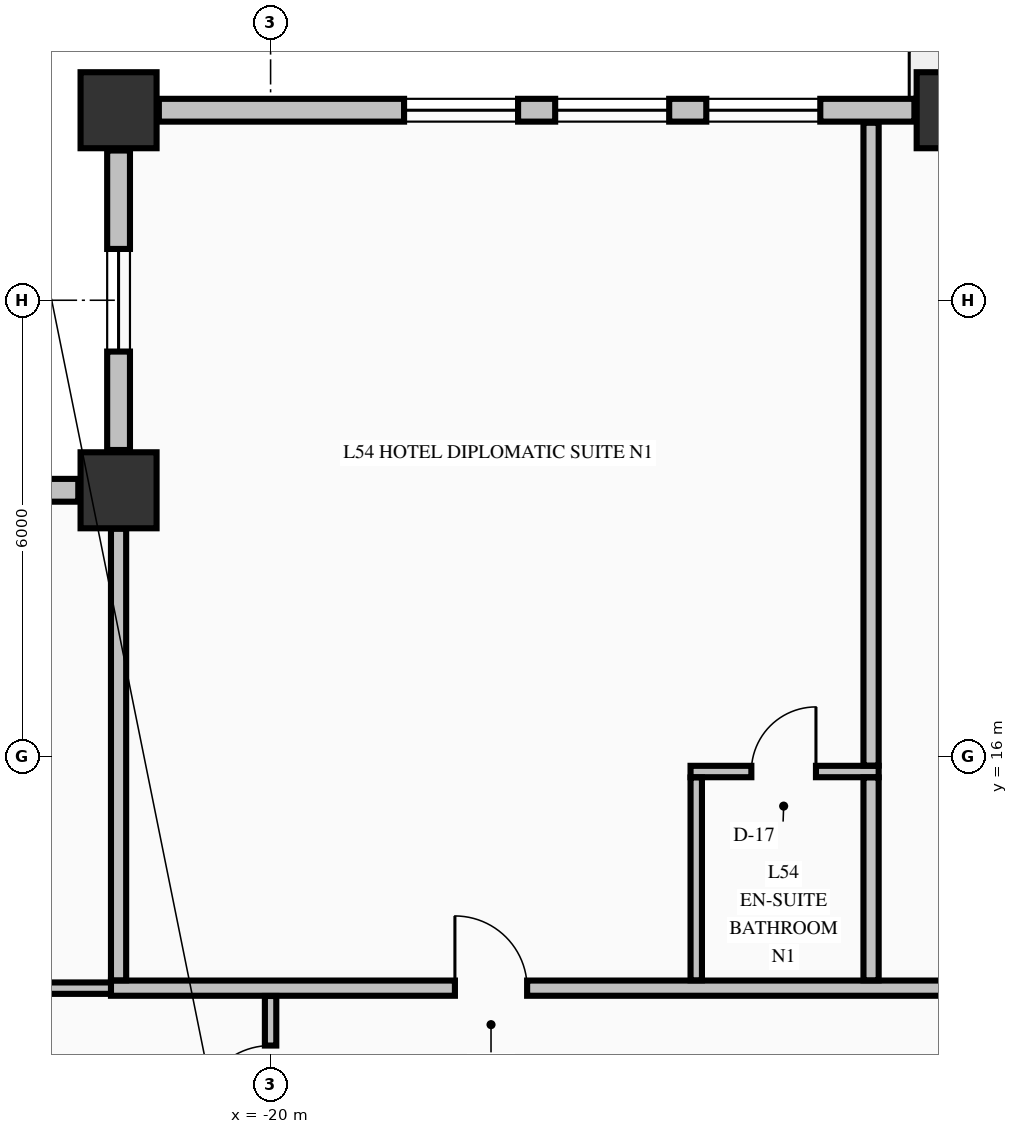
"""IFC4 building model, lengths in metres.
Left out: names, types, materials, properties, quantities, classifications, styles, units other than length and angle.
Written with IfcOpenShell. Run it as: python <this file> out.ifc"""

import sys

from ifc_helpers import new_model, si_unit, direction, frame, frame_2d, origin, origin_2d, place, context, subcontext, project, spatial, rectangle, extrude, element, fill, save


model = new_model("IFC4")
c1 = context("Model", 3, precision=1e-05, world=origin(), true_north=direction((0.0, 1.0)))
c2 = subcontext(c1, "Body", "Model", "MODEL_VIEW")
j1 = project(units=[si_unit("LENGTHUNIT", "METRE"), si_unit("PLANEANGLEUNIT", "RADIAN")], contexts=[c1])
p1 = place(None, origin())
s1 = spatial("IfcSite", under=j1, at=p1, CompositionType="ELEMENT")
p2 = place(p1, origin())
s2 = spatial("IfcBuilding", under=s1, at=p2, CompositionType="ELEMENT")
p3 = place(p2, frame((0.0, 0.0, 208.46)))
s3 = spatial("IfcBuildingStorey", under=s2, at=p3, CompositionType="ELEMENT", Elevation=208.46)
for number, where, z_axis, x_axis in (
    (1, (-22.0, 24.5, -0.25), (0.0, 0.0, 1.0), (1.0, 0.0, 0.0)),
    (2, (-11.0, 24.5, -0.25), (0.0, 0.0, 1.0), (1.0, 0.0, 0.0)),
    (3, (-22.0, 19.5, -0.25), (0.0, 0.0, 1.0), (1.0, 0.0, 0.0)),
):
    element("IfcColumn", number, at=place(p3, frame(where, z_axis=z_axis, x_axis=x_axis)), inside=s3, PredefinedType="COLUMN", context=c2, shape_type="SweptSolid", body=[
        extrude(rectangle(XDim=1.0, YDim=1.0, at=origin_2d()), origin(), (0.0, 0.0, 1.0), 3.325),
    ])
p4 = place(p3, frame((-22.0, 23.97, 0.0), z_axis=(0.0, 0.0, 1.0), x_axis=(0.0, -1.0, 0.0)))
e4 = element("IfcWall", 4, at=p4, inside=s3, PredefinedType="STANDARD", context=c2, shape_type="SweptSolid", body=[
    extrude(rectangle(XDim=3.94, YDim=0.3, at=frame_2d((1.97, 0.0))), origin(), (0.0, 0.0, 1.0), 2.467),
])
p5 = place(p4, frame((1.295, 0.0, 0.68)))
e5 = element("IfcOpeningElement", 5, at=p5, cuts=e4, PredefinedType="OPENING", context=c2, shape_type="SweptSolid", body=[
    extrude(rectangle(XDim=1.35, YDim=1.42, at=frame_2d((0.675, 0.71))), frame((0.0, 0.16, 0.0), z_axis=(0.0, -1.0, 0.0), x_axis=(1.0, 0.0, 0.0)), (0.0, 0.0, 1.0), 0.32),
])
p6 = place(p3, frame((-22.53, 19.5, 0.0), z_axis=(0.0, 0.0, 1.0), x_axis=(-1.0, 0.0, 0.0)))
e6 = element("IfcWall", 6, at=p6, inside=s3, PredefinedType="STANDARD", context=c2, shape_type="SweptSolid", body=[
    extrude(rectangle(XDim=3.94, YDim=0.3, at=frame_2d((1.97, 0.0))), origin(), (0.0, 0.0, 1.0), 2.467),
])
p7 = place(p6, frame((1.295, 0.0, 0.68)))
e7 = element("IfcOpeningElement", 7, at=p7, cuts=e6, PredefinedType="OPENING", context=c2, shape_type="SweptSolid", body=[
    extrude(rectangle(XDim=1.35, YDim=1.42, at=frame_2d((0.675, 0.71))), frame((0.0, 0.16, 0.0), z_axis=(0.0, -1.0, 0.0), x_axis=(1.0, 0.0, 0.0)), (0.0, 0.0, 1.0), 0.32),
])
p8 = place(p3, frame((-11.53, 24.5, 0.0), z_axis=(0.0, 0.0, 1.0), x_axis=(-1.0, 0.0, 0.0)))
e8 = element("IfcWall", 8, at=p8, inside=s3, PredefinedType="STANDARD", context=c2, shape_type="SweptSolid", body=[
    extrude(rectangle(XDim=9.94, YDim=0.3, at=frame_2d((4.97, 0.0))), origin(), (0.0, 0.0, 1.0), 2.467),
])
p9 = place(p8, frame((1.238, 0.0, 0.72)))
e9 = element("IfcOpeningElement", 9, at=p9, cuts=e8, PredefinedType="OPENING", context=c2, shape_type="SweptSolid", body=[
    extrude(rectangle(XDim=1.5, YDim=1.6, at=frame_2d((0.75, 0.8))), frame((0.0, 0.16, 0.0), z_axis=(0.0, -1.0, 0.0), x_axis=(1.0, 0.0, 0.0)), (0.0, 0.0, 1.0), 0.32),
])
p10 = place(p8, frame((3.226, 0.0, 0.72)))
e10 = element("IfcOpeningElement", 10, at=p10, cuts=e8, PredefinedType="OPENING", context=c2, shape_type="SweptSolid", body=[
    extrude(rectangle(XDim=1.5, YDim=1.6, at=frame_2d((0.75, 0.8))), frame((0.0, 0.16, 0.0), z_axis=(0.0, -1.0, 0.0), x_axis=(1.0, 0.0, 0.0)), (0.0, 0.0, 1.0), 0.32),
])
p11 = place(p8, frame((5.214, 0.0, 0.72)))
e11 = element("IfcOpeningElement", 11, at=p11, cuts=e8, PredefinedType="OPENING", context=c2, shape_type="SweptSolid", body=[
    extrude(rectangle(XDim=1.5, YDim=1.6, at=frame_2d((0.75, 0.8))), frame((0.0, 0.16, 0.0), z_axis=(0.0, -1.0, 0.0), x_axis=(1.0, 0.0, 0.0)), (0.0, 0.0, 1.0), 0.32),
])
p12 = place(p3, frame((-26.835, 12.95, 0.0), z_axis=(0.0, 0.0, 1.0), x_axis=(1.0, 0.0, 0.0)))
e12 = element("IfcWall", 12, at=p12, inside=s3, PredefinedType="PARTITIONING", context=c2, shape_type="SweptSolid", body=[
    extrude(rectangle(XDim=4.935, YDim=0.15, at=frame_2d((2.468, 0.0))), origin(), (0.0, 0.0, 1.0), 3.075),
])
p13 = place(p3, frame((-22.1, 12.95, 0.0), z_axis=(0.0, 0.0, 1.0), x_axis=(1.0, 0.0, 0.0)))
e13 = element("IfcWall", 13, at=p13, inside=s3, PredefinedType="PARTITIONING", context=c2, shape_type="SweptSolid", body=[
    extrude(rectangle(XDim=39.2, YDim=0.2, at=frame_2d((19.6, 0.0))), origin(), (0.0, 0.0, 1.0), 3.075),
])
p14 = place(p13, frame((4.525, 0.0, 0.0)))
e14 = element("IfcOpeningElement", 14, at=p14, cuts=e13, PredefinedType="OPENING", context=c2, shape_type="SweptSolid", body=[
    extrude(rectangle(XDim=0.95, YDim=2.15, at=frame_2d((0.475, 1.075))), frame((0.0, 0.11, 0.0), z_axis=(0.0, -1.0, 0.0), x_axis=(1.0, 0.0, 0.0)), (0.0, 0.0, 1.0), 0.22),
])
p15 = place(p13, frame((12.475, 0.0, 0.0)))
e15 = element("IfcOpeningElement", 15, at=p15, cuts=e13, PredefinedType="OPENING", context=c2, shape_type="SweptSolid", body=[
    extrude(rectangle(XDim=0.95, YDim=2.15, at=frame_2d((0.475, 1.075))), frame((0.0, 0.11, 0.0), z_axis=(0.0, -1.0, 0.0), x_axis=(1.0, 0.0, 0.0)), (0.0, 0.0, 1.0), 0.22),
])
p16 = place(p13, frame((22.175, 0.0, 0.0)))
e16 = element("IfcOpeningElement", 16, at=p16, cuts=e13, PredefinedType="OPENING", context=c2, shape_type="SweptSolid", body=[
    extrude(rectangle(XDim=0.95, YDim=2.15, at=frame_2d((0.475, 1.075))), frame((0.0, 0.11, 0.0), z_axis=(0.0, -1.0, 0.0), x_axis=(1.0, 0.0, 0.0)), (0.0, 0.0, 1.0), 0.22),
])
p17 = place(p13, frame((34.675, 0.0, 0.0)))
e17 = element("IfcOpeningElement", 17, at=p17, cuts=e13, PredefinedType="OPENING", context=c2, shape_type="SweptSolid", body=[
    extrude(rectangle(XDim=0.95, YDim=2.15, at=frame_2d((0.475, 1.075))), frame((0.0, 0.11, 0.0), z_axis=(0.0, -1.0, 0.0), x_axis=(1.0, 0.0, 0.0)), (0.0, 0.0, 1.0), 0.22),
])
p18 = place(p3, frame((-14.475, 15.8, 0.0), z_axis=(0.0, 0.0, 1.0), x_axis=(1.0, 0.0, 0.0)))
e18 = element("IfcWall", 18, at=p18, inside=s3, PredefinedType="PARTITIONING", context=c2, shape_type="SweptSolid", body=[
    extrude(rectangle(XDim=2.475, YDim=0.15, at=frame_2d((1.238, 0.0))), origin(), (0.0, 0.0, 1.0), 3.075),
])
p19 = place(p18, frame((0.8, 0.0, 0.0)))
e19 = element("IfcOpeningElement", 19, at=p19, cuts=e18, PredefinedType="OPENING", context=c2, shape_type="SweptSolid", body=[
    extrude(rectangle(XDim=0.85, YDim=2.1, at=frame_2d((0.425, 1.05))), frame((0.0, 0.085, 0.0), z_axis=(0.0, -1.0, 0.0), x_axis=(1.0, 0.0, 0.0)), (0.0, 0.0, 1.0), 0.17),
])
p20 = place(p3, frame((-22.0, 13.053, 0.0), z_axis=(0.0, 0.0, 1.0), x_axis=(0.0, 1.0, 0.0)))
e20 = element("IfcWall", 20, at=p20, inside=s3, PredefinedType="PARTITIONING", context=c2, shape_type="SweptSolid", body=[
    extrude(rectangle(XDim=5.941, YDim=0.2, at=frame_2d((2.97, 0.0))), origin(), (0.0, 0.0, 1.0), 3.075),
])
p21 = place(p3, frame((-20.0, 10.931, 0.0), z_axis=(0.0, 0.0, 1.0), x_axis=(0.0, 1.0, 0.0)))
e21 = element("IfcWall", 21, at=p21, inside=s3, PredefinedType="PARTITIONING", context=c2, shape_type="SweptSolid", body=[
    extrude(rectangle(XDim=1.916, YDim=0.15, at=frame_2d((0.958, 0.0))), origin(), (0.0, 0.0, 1.0), 2.267),
])
p22 = place(p21, frame((0.314, 0.0, 0.0)))
e22 = element("IfcOpeningElement", 22, at=p22, cuts=e21, PredefinedType="OPENING", context=c2, shape_type="SweptSolid", body=[
    extrude(rectangle(XDim=0.95, YDim=2.15, at=frame_2d((0.475, 1.075))), frame((0.0, 0.085, 0.0), z_axis=(0.0, -1.0, 0.0), x_axis=(1.0, 0.0, 0.0)), (0.0, 0.0, 1.0), 0.17),
])
p23 = place(p3, frame((-14.4, 13.053, 0.0), z_axis=(0.0, 0.0, 1.0), x_axis=(0.0, 1.0, 0.0)))
e23 = element("IfcWall", 23, at=p23, inside=s3, PredefinedType="PARTITIONING", context=c2, shape_type="SweptSolid", body=[
    extrude(rectangle(XDim=2.669, YDim=0.15, at=frame_2d((1.334, 0.0))), origin(), (0.0, 0.0, 1.0), 3.075),
])
p24 = place(p3, frame((-12.1, 13.053, 0.0), z_axis=(0.0, 0.0, 1.0), x_axis=(0.0, 1.0, 0.0)))
e24 = element("IfcWall", 24, at=p24, inside=s3, PredefinedType="PARTITIONING", context=c2, shape_type="SweptSolid", body=[
    extrude(rectangle(XDim=2.669, YDim=0.2, at=frame_2d((1.334, 0.0))), origin(), (0.0, 0.0, 1.0), 3.075),
])
p25 = place(p3, frame((-12.1, 15.878, 0.0), z_axis=(0.0, 0.0, 1.0), x_axis=(0.0, 1.0, 0.0)))
e25 = element("IfcWall", 25, at=p25, inside=s3, PredefinedType="PARTITIONING", context=c2, shape_type="SweptSolid", body=[
    extrude(rectangle(XDim=8.457, YDim=0.2, at=frame_2d((4.229, 0.0))), origin(), (0.0, 0.0, 1.0), 3.075),
])
p26 = place(p5, origin())
e26 = element("IfcWindow", 26, at=p26, inside=s3, PartitioningType="SINGLE_PANEL", PredefinedType="WINDOW", context=c2, shape_type="SweptSolid", body=[
    extrude(rectangle(XDim=1.35, YDim=1.42, at=frame_2d((0.675, 0.71))), frame((0.0, 0.03, 0.0), z_axis=(0.0, -1.0, 0.0), x_axis=(1.0, 0.0, 0.0)), (0.0, 0.0, 1.0), 0.06),
])
fill(e5, e26)
p27 = place(p9, origin())
e27 = element("IfcWindow", 27, at=p27, inside=s3, PartitioningType="SINGLE_PANEL", PredefinedType="WINDOW", context=c2, shape_type="SweptSolid", body=[
    extrude(rectangle(XDim=1.5, YDim=1.6, at=frame_2d((0.75, 0.8))), frame((0.0, 0.03, 0.0), z_axis=(0.0, -1.0, 0.0), x_axis=(1.0, 0.0, 0.0)), (0.0, 0.0, 1.0), 0.06),
])
fill(e9, e27)
p28 = place(p10, origin())
e28 = element("IfcWindow", 28, at=p28, inside=s3, PartitioningType="SINGLE_PANEL", PredefinedType="WINDOW", context=c2, shape_type="SweptSolid", body=[
    extrude(rectangle(XDim=1.5, YDim=1.6, at=frame_2d((0.75, 0.8))), frame((0.0, 0.03, 0.0), z_axis=(0.0, -1.0, 0.0), x_axis=(1.0, 0.0, 0.0)), (0.0, 0.0, 1.0), 0.06),
])
fill(e10, e28)
p29 = place(p11, origin())
e29 = element("IfcWindow", 29, at=p29, inside=s3, PartitioningType="SINGLE_PANEL", PredefinedType="WINDOW", context=c2, shape_type="SweptSolid", body=[
    extrude(rectangle(XDim=1.5, YDim=1.6, at=frame_2d((0.75, 0.8))), frame((0.0, 0.03, 0.0), z_axis=(0.0, -1.0, 0.0), x_axis=(1.0, 0.0, 0.0)), (0.0, 0.0, 1.0), 0.06),
])
fill(e11, e29)
p30 = place(p14, origin())
e30 = element("IfcDoor", 30, at=p30, inside=s3, OperationType="SINGLE_SWING_LEFT", PredefinedType="DOOR", context=c2, shape_type="SweptSolid", body=[
    extrude(rectangle(XDim=0.95, YDim=2.15, at=frame_2d((0.475, 1.075))), frame((0.0, 0.025, 0.0), z_axis=(0.0, -1.0, 0.0), x_axis=(1.0, 0.0, 0.0)), (0.0, 0.0, 1.0), 0.05),
])
fill(e14, e30)
p31 = place(p19, origin())
e31 = element("IfcDoor", 31, at=p31, inside=s3, OperationType="SINGLE_SWING_RIGHT", PredefinedType="DOOR", context=c2, shape_type="SweptSolid", body=[
    extrude(rectangle(XDim=0.85, YDim=2.1, at=frame_2d((0.425, 1.05))), frame((0.0, 0.025, 0.0), z_axis=(0.0, -1.0, 0.0), x_axis=(1.0, 0.0, 0.0)), (0.0, 0.0, 1.0), 0.05),
])
fill(e19, e31)
p32 = place(p22, origin())
e32 = element("IfcDoor", 32, at=p32, inside=s3, OperationType="SINGLE_SWING_LEFT", PredefinedType="DOOR", context=c2, shape_type="SweptSolid", body=[
    extrude(rectangle(XDim=0.95, YDim=2.15, at=frame_2d((0.475, 1.075))), frame((0.0, 0.025, 0.0), z_axis=(0.0, -1.0, 0.0), x_axis=(1.0, 0.0, 0.0)), (0.0, 0.0, 1.0), 0.05),
])
fill(e22, e32)
save(model, sys.argv[1])
